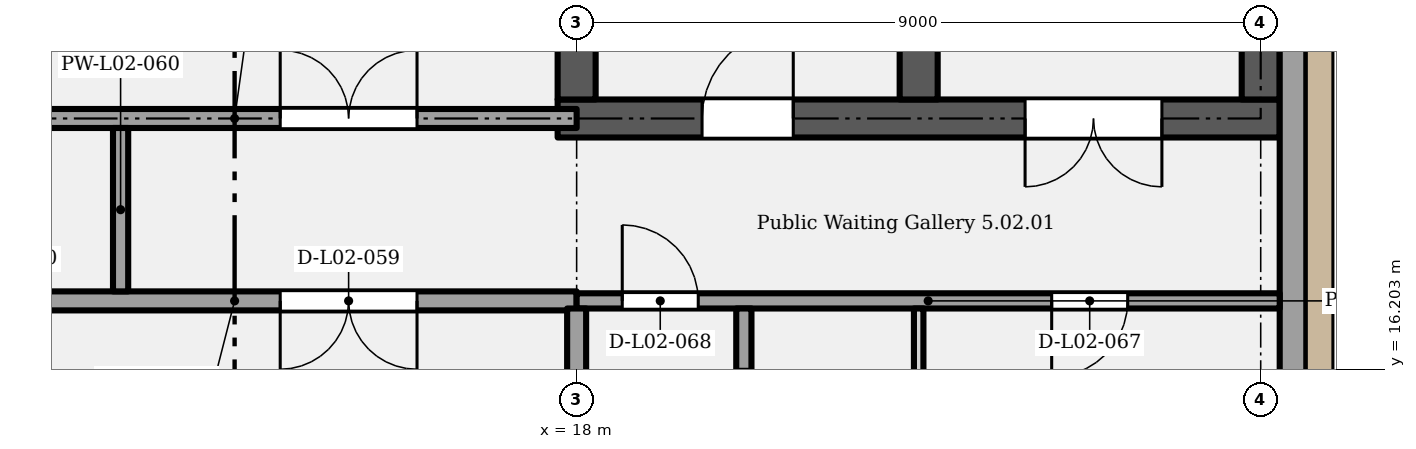
"""IFC4 building model, lengths in metres.
Left out: names, types, materials, properties, quantities, classifications, styles, units other than length and angle.
Written with IfcOpenShell. Run it as: python <this file> out.ifc"""

import sys

from ifc_helpers import new_model, si_unit, direction, frame, frame_2d, origin, place, context, subcontext, project, spatial, rectangle, extrude, element, fill, save


model = new_model("IFC4")
c1 = context("Model", 3, precision=1e-05, world=origin(), true_north=direction((0.0, 1.0)))
c2 = subcontext(c1, "Body", "Model", "MODEL_VIEW")
j1 = project(units=[si_unit("LENGTHUNIT", "METRE"), si_unit("PLANEANGLEUNIT", "RADIAN")], contexts=[c1])
p1 = place(None, origin())
s1 = spatial("IfcSite", under=j1, at=p1, CompositionType="ELEMENT")
p2 = place(p1, origin())
s2 = spatial("IfcBuilding", under=s1, at=p2, CompositionType="ELEMENT")
p3 = place(p2, frame((0.0, 0.0, 12.0)))
s3 = spatial("IfcBuildingStorey", under=s2, at=p3, CompositionType="ELEMENT", Elevation=12.0)
p4 = place(p3, frame((17.75, 19.5, 0.0), z_axis=(0.0, 0.0, 1.0), x_axis=(1.0, 0.0, 0.0)))
e1 = element("IfcWall", 1, at=p4, inside=s3, PredefinedType="SHEAR", context=c2, shape_type="SweptSolid", body=[
    extrude(rectangle(XDim=9.5, YDim=0.5, at=frame_2d((4.75, 0.0))), origin(), (0.0, 0.0, 1.0), 5.15),
])
p5 = place(p4, frame((1.9, 0.0, 0.0)))
e2 = element("IfcOpeningElement", 2, at=p5, cuts=e1, PredefinedType="OPENING", context=c2, shape_type="SweptSolid", body=[
    extrude(rectangle(XDim=1.2, YDim=2.1, at=frame_2d((0.6, 1.05))), frame((0.0, 0.26, 0.0), z_axis=(0.0, -1.0, 0.0), x_axis=(1.0, 0.0, 0.0)), (0.0, 0.0, 1.0), 0.52),
])
p6 = place(p4, frame((7.95, 0.0, 0.0), z_axis=(0.0, 0.0, 1.0), x_axis=(-1.0, 0.0, 0.0)))
e3 = element("IfcOpeningElement", 3, at=p6, cuts=e1, PredefinedType="OPENING", context=c2, shape_type="SweptSolid", body=[
    extrude(rectangle(XDim=1.8, YDim=2.1, at=frame_2d((0.9, 1.05))), frame((0.0, 0.26, 0.0), z_axis=(0.0, -1.0, 0.0), x_axis=(1.0, 0.0, 0.0)), (0.0, 0.0, 1.0), 0.52),
])
p7 = place(p3, frame((18.0, 19.75, 0.0), z_axis=(0.0, 0.0, 1.0), x_axis=(0.0, 1.0, 0.0)))
e4 = element("IfcWall", 4, at=p7, inside=s3, PredefinedType="SHEAR", context=c2, shape_type="SweptSolid", body=[
    extrude(rectangle(XDim=8.1, YDim=0.5, at=frame_2d((4.05, 0.0))), origin(), (0.0, 0.0, 1.0), 5.15),
])
p8 = place(p3, frame((22.5, 19.75, 0.0), z_axis=(0.0, 0.0, 1.0), x_axis=(0.0, 1.0, 0.0)))
e5 = element("IfcWall", 5, at=p8, inside=s3, PredefinedType="SHEAR", context=c2, shape_type="SweptSolid", body=[
    extrude(rectangle(XDim=8.5, YDim=0.5, at=frame_2d((4.25, 0.0))), origin(), (0.0, 0.0, 1.0), 5.15),
])
p9 = place(p3, frame((27.0, 19.75, 0.0), z_axis=(0.0, 0.0, 1.0), x_axis=(0.0, 1.0, 0.0)))
e6 = element("IfcWall", 6, at=p9, inside=s3, PredefinedType="SHEAR", context=c2, shape_type="SweptSolid", body=[
    extrude(rectangle(XDim=8.1, YDim=0.5, at=frame_2d((4.05, 0.0))), origin(), (0.0, 0.0, 1.0), 5.15),
])
p10 = place(p3, frame((27.425, 14.325, 0.0), z_axis=(0.0, 0.0, 1.0), x_axis=(0.0, 1.0, 0.0)))
e7 = element("IfcWall", 7, at=p10, inside=s3, PredefinedType="SOLIDWALL", context=c2, shape_type="SweptSolid", body=[
    extrude(rectangle(XDim=13.525, YDim=0.35, at=frame_2d((6.763, 0.0))), origin(), (0.0, 0.0, 1.0), 5.15),
])
p11 = place(p3, frame((9.0, 17.1, 0.0), z_axis=(0.0, 0.0, 1.0), x_axis=(1.0, 0.0, 0.0)))
e8 = element("IfcWall", 8, at=p11, inside=s3, PredefinedType="PARTITIONING", context=c2, shape_type="SweptSolid", body=[
    extrude(rectangle(XDim=9.0, YDim=0.25, at=frame_2d((4.5, 0.0))), origin(), (0.0, 0.0, 1.0), 5.15),
])
p12 = place(p11, frame((6.9, 0.0, 0.0), z_axis=(0.0, 0.0, 1.0), x_axis=(-1.0, 0.0, 0.0)))
e9 = element("IfcOpeningElement", 9, at=p12, cuts=e8, PredefinedType="OPENING", context=c2, shape_type="SweptSolid", body=[
    extrude(rectangle(XDim=1.8, YDim=2.4, at=frame_2d((0.9, 1.2))), frame((0.0, 0.135, 0.0), z_axis=(0.0, -1.0, 0.0), x_axis=(1.0, 0.0, 0.0)), (0.0, 0.0, 1.0), 0.27),
])
p13 = place(p11, frame((2.0, 0.0, 0.0), z_axis=(0.0, 0.0, 1.0), x_axis=(-1.0, 0.0, 0.0)))
e10 = element("IfcOpeningElement", 10, at=p13, cuts=e8, PredefinedType="OPENING", context=c2, shape_type="SweptSolid", body=[
    extrude(rectangle(XDim=1.0, YDim=2.1, at=frame_2d((0.5, 1.05))), frame((0.0, 0.135, 0.0), z_axis=(0.0, -1.0, 0.0), x_axis=(1.0, 0.0, 0.0)), (0.0, 0.0, 1.0), 0.27),
])
p14 = place(p3, frame((18.0, 17.1, 0.0), z_axis=(0.0, 0.0, 1.0), x_axis=(1.0, 0.0, 0.0)))
e11 = element("IfcWall", 11, at=p14, inside=s3, PredefinedType="PARTITIONING", context=c2, shape_type="SweptSolid", body=[
    extrude(rectangle(XDim=9.25, YDim=0.2, at=frame_2d((4.625, 0.0))), origin(), (0.0, 0.0, 1.0), 5.15),
])
p15 = place(p14, frame((7.25, 0.0, 0.0), z_axis=(0.0, 0.0, 1.0), x_axis=(-1.0, 0.0, 0.0)))
e12 = element("IfcOpeningElement", 12, at=p15, cuts=e11, PredefinedType="OPENING", context=c2, shape_type="SweptSolid", body=[
    extrude(rectangle(XDim=1.0, YDim=2.1, at=frame_2d((0.5, 1.05))), frame((0.0, 0.11, 0.0), z_axis=(0.0, -1.0, 0.0), x_axis=(1.0, 0.0, 0.0)), (0.0, 0.0, 1.0), 0.22),
])
p16 = place(p14, frame((0.6, 0.0, 0.0)))
e13 = element("IfcOpeningElement", 13, at=p16, cuts=e11, PredefinedType="OPENING", context=c2, shape_type="SweptSolid", body=[
    extrude(rectangle(XDim=1.0, YDim=2.1, at=frame_2d((0.5, 1.05))), frame((0.0, 0.11, 0.0), z_axis=(0.0, -1.0, 0.0), x_axis=(1.0, 0.0, 0.0)), (0.0, 0.0, 1.0), 0.22),
])
p17 = place(p3, frame((9.0, 19.5, 0.0), z_axis=(0.0, 0.0, 1.0), x_axis=(1.0, 0.0, 0.0)))
e14 = element("IfcWall", 14, at=p17, inside=s3, PredefinedType="PARTITIONING", context=c2, shape_type="SweptSolid", body=[
    extrude(rectangle(XDim=9.0, YDim=0.25, at=frame_2d((4.5, 0.0))), origin(), (0.0, 0.0, 1.0), 5.15),
])
p18 = place(p17, frame((5.1, 0.0, 0.0)))
e15 = element("IfcOpeningElement", 15, at=p18, cuts=e14, PredefinedType="OPENING", context=c2, shape_type="SweptSolid", body=[
    extrude(rectangle(XDim=1.8, YDim=2.4, at=frame_2d((0.9, 1.2))), frame((0.0, 0.135, 0.0), z_axis=(0.0, -1.0, 0.0), x_axis=(1.0, 0.0, 0.0)), (0.0, 0.0, 1.0), 0.27),
])
p19 = place(p17, frame((1.0, 0.0, 0.0)))
e16 = element("IfcOpeningElement", 16, at=p19, cuts=e14, PredefinedType="OPENING", context=c2, shape_type="SweptSolid", body=[
    extrude(rectangle(XDim=1.0, YDim=2.1, at=frame_2d((0.5, 1.05))), frame((0.0, 0.135, 0.0), z_axis=(0.0, -1.0, 0.0), x_axis=(1.0, 0.0, 0.0)), (0.0, 0.0, 1.0), 0.27),
])
p20 = place(p3, frame((12.0, 17.225, 0.0), z_axis=(0.0, 0.0, 1.0), x_axis=(0.0, 1.0, 0.0)))
e17 = element("IfcWall", 17, at=p20, inside=s3, PredefinedType="PARTITIONING", context=c2, shape_type="SweptSolid", body=[
    extrude(rectangle(XDim=2.15, YDim=0.2, at=frame_2d((1.075, 0.0))), origin(), (0.0, 0.0, 1.0), 5.15),
])
p21 = place(p3, frame((18.0, 12.65, 0.0), z_axis=(0.0, 0.0, 1.0), x_axis=(0.0, 1.0, 0.0)))
e18 = element("IfcWall", 18, at=p21, inside=s3, PredefinedType="PARTITIONING", context=c2, shape_type="SweptSolid", body=[
    extrude(rectangle(XDim=4.35, YDim=0.25, at=frame_2d((2.175, 0.0))), origin(), (0.0, 0.0, 1.0), 4.2),
])
p22 = place(p3, frame((20.2, 8.163, 0.0), z_axis=(0.0, 0.0, 1.0), x_axis=(0.0, 1.0, 0.0)))
e19 = element("IfcWall", 19, at=p22, inside=s3, PredefinedType="PARTITIONING", context=c2, shape_type="SweptSolid", body=[
    extrude(rectangle(XDim=8.837, YDim=0.2, at=frame_2d((4.419, 0.0))), origin(), (0.0, 0.0, 1.0), 5.15),
])
p23 = place(p22, frame((8.037, 0.0, 0.0), z_axis=(0.0, 0.0, 1.0), x_axis=(-1.0, 0.0, 0.0)))
e20 = element("IfcOpeningElement", 20, at=p23, cuts=e19, PredefinedType="OPENING", context=c2, shape_type="SweptSolid", body=[
    extrude(rectangle(XDim=0.9, YDim=2.1, at=frame_2d((0.45, 1.05))), frame((0.0, 0.11, 0.0), z_axis=(0.0, -1.0, 0.0), x_axis=(1.0, 0.0, 0.0)), (0.0, 0.0, 1.0), 0.22),
])
p24 = place(p22, frame((5.337, 0.0, 0.0), z_axis=(0.0, 0.0, 1.0), x_axis=(-1.0, 0.0, 0.0)))
e21 = element("IfcOpeningElement", 21, at=p24, cuts=e19, PredefinedType="OPENING", context=c2, shape_type="SweptSolid", body=[
    extrude(rectangle(XDim=0.9, YDim=2.1, at=frame_2d((0.45, 1.05))), frame((0.0, 0.11, 0.0), z_axis=(0.0, -1.0, 0.0), x_axis=(1.0, 0.0, 0.0)), (0.0, 0.0, 1.0), 0.22),
])
p25 = place(p22, frame((2.238, 0.0, 0.0), z_axis=(0.0, 0.0, 1.0), x_axis=(-1.0, 0.0, 0.0)))
e22 = element("IfcOpeningElement", 22, at=p25, cuts=e19, PredefinedType="OPENING", context=c2, shape_type="SweptSolid", body=[
    extrude(rectangle(XDim=1.0, YDim=2.1, at=frame_2d((0.5, 1.05))), frame((0.0, 0.11, 0.0), z_axis=(0.0, -1.0, 0.0), x_axis=(1.0, 0.0, 0.0)), (0.0, 0.0, 1.0), 0.22),
])
p26 = place(p3, frame((22.5, 8.163, 0.0), z_axis=(0.0, 0.0, 1.0), x_axis=(0.0, 1.0, 0.0)))
e23 = element("IfcWall", 23, at=p26, inside=s3, PredefinedType="PARTITIONING", context=c2, shape_type="SweptSolid", body=[
    extrude(rectangle(XDim=8.837, YDim=0.125, at=frame_2d((4.419, 0.0))), origin(), (0.0, 0.0, 1.0), 5.15),
])
p27 = place(p5, origin())
e24 = element("IfcDoor", 24, at=p27, inside=s3, OperationType="SINGLE_SWING_RIGHT", PredefinedType="DOOR", context=c2, shape_type="SweptSolid", body=[
    extrude(rectangle(XDim=1.2, YDim=2.1, at=frame_2d((0.6, 1.05))), frame((0.0, 0.025, 0.0), z_axis=(0.0, -1.0, 0.0), x_axis=(1.0, 0.0, 0.0)), (0.0, 0.0, 1.0), 0.05),
])
fill(e2, e24)
p28 = place(p6, origin())
e25 = element("IfcDoor", 25, at=p28, inside=s3, OperationType="DOUBLE_DOOR_SINGLE_SWING", PredefinedType="DOOR", context=c2, shape_type="SweptSolid", body=[
    extrude(rectangle(XDim=1.8, YDim=2.1, at=frame_2d((0.9, 1.05))), frame((0.0, 0.025, 0.0), z_axis=(0.0, -1.0, 0.0), x_axis=(1.0, 0.0, 0.0)), (0.0, 0.0, 1.0), 0.05),
])
fill(e3, e25)
p29 = place(p12, origin())
e26 = element("IfcDoor", 26, at=p29, inside=s3, OperationType="DOUBLE_DOOR_SINGLE_SWING", PredefinedType="DOOR", context=c2, shape_type="SweptSolid", body=[
    extrude(rectangle(XDim=1.8, YDim=2.4, at=frame_2d((0.9, 1.2))), frame((0.0, 0.025, 0.0), z_axis=(0.0, -1.0, 0.0), x_axis=(1.0, 0.0, 0.0)), (0.0, 0.0, 1.0), 0.05),
])
fill(e9, e26)
p30 = place(p18, origin())
e27 = element("IfcDoor", 27, at=p30, inside=s3, OperationType="DOUBLE_DOOR_SINGLE_SWING", PredefinedType="DOOR", context=c2, shape_type="SweptSolid", body=[
    extrude(rectangle(XDim=1.8, YDim=2.4, at=frame_2d((0.9, 1.2))), frame((0.0, 0.025, 0.0), z_axis=(0.0, -1.0, 0.0), x_axis=(1.0, 0.0, 0.0)), (0.0, 0.0, 1.0), 0.05),
])
fill(e15, e27)
p31 = place(p15, origin())
e28 = element("IfcDoor", 28, at=p31, inside=s3, OperationType="SINGLE_SWING_RIGHT", PredefinedType="DOOR", context=c2, shape_type="SweptSolid", body=[
    extrude(rectangle(XDim=1.0, YDim=2.1, at=frame_2d((0.5, 1.05))), frame((0.0, 0.025, 0.0), z_axis=(0.0, -1.0, 0.0), x_axis=(1.0, 0.0, 0.0)), (0.0, 0.0, 1.0), 0.05),
])
fill(e12, e28)
p32 = place(p16, origin())
e29 = element("IfcDoor", 29, at=p32, inside=s3, OperationType="SINGLE_SWING_LEFT", PredefinedType="DOOR", context=c2, shape_type="SweptSolid", body=[
    extrude(rectangle(XDim=1.0, YDim=2.1, at=frame_2d((0.5, 1.05))), frame((0.0, 0.025, 0.0), z_axis=(0.0, -1.0, 0.0), x_axis=(1.0, 0.0, 0.0)), (0.0, 0.0, 1.0), 0.05),
])
fill(e13, e29)
save(model, sys.argv[1])
